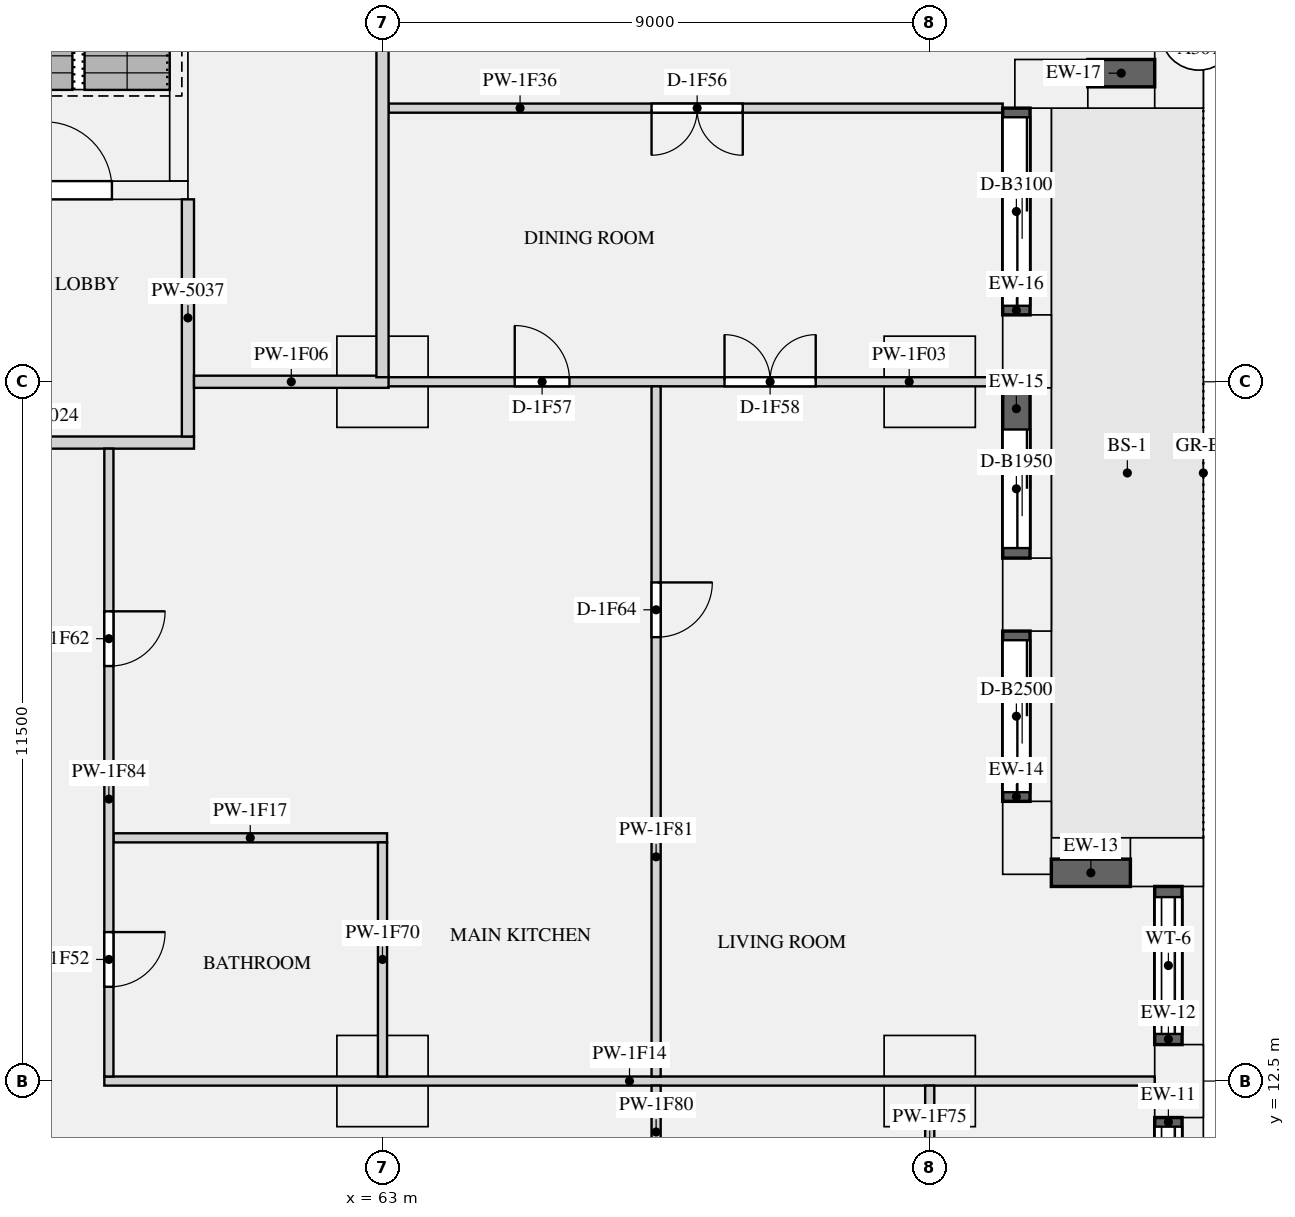
"""IFC4 building model, lengths in metres.
Left out: names, types, materials, properties, quantities, classifications, styles, units other than length and angle.
Written with IfcOpenShell. Run it as: python <this file> out.ifc"""

import sys

from ifc_helpers import new_model, si_unit, direction, frame, frame_2d, origin, origin_2d, place, context, subcontext, project, spatial, rectangle, extrude, element, fill, save


model = new_model("IFC4")
c1 = context("Model", 3, precision=1e-05, world=origin(), true_north=direction((0.0, 1.0)))
c2 = subcontext(c1, "Body", "Model", "MODEL_VIEW")
j1 = project(units=[si_unit("LENGTHUNIT", "METRE"), si_unit("PLANEANGLEUNIT", "RADIAN")], contexts=[c1])
p1 = place(None, origin())
s1 = spatial("IfcSite", under=j1, at=p1, CompositionType="ELEMENT")
p2 = place(p1, origin())
s2 = spatial("IfcBuilding", under=s1, at=p2, CompositionType="ELEMENT")
p3 = place(p2, frame((0.0, 0.0, 60.45)))
s3 = spatial("IfcBuildingStorey", under=s2, at=p3, CompositionType="ELEMENT", Elevation=60.45)
for number, where, z_axis, x_axis in (
    (1, (76.1, 12.5, 0.0), (0.0, 0.0, 1.0), (0.0, 1.0, 0.0)),
    (2, (75.9, 16.1, 0.0), (0.0, 0.0, 1.0), (-1.0, 0.0, 0.0)),
    (3, (73.6, 16.5, 0.0), (0.0, 0.0, 1.0), (0.0, 1.0, 0.0)),
    (4, (73.6, 20.5, 0.0), (0.0, 0.0, 1.0), (0.0, 1.0, 0.0)),
    (5, (73.6, 24.5, 0.0), (0.0, 0.0, 1.0), (0.0, 1.0, 0.0)),
    (6, (74.0, 28.9, 0.0), (0.0, 0.0, 1.0), (1.0, 0.0, 0.0)),
    (7, (76.1, 29.1, 0.0), (0.0, 0.0, 1.0), (0.0, 1.0, 0.0)),
):
    element("IfcColumn", number, at=place(p3, frame(where, z_axis=z_axis, x_axis=x_axis)), inside=s3, PredefinedType="USERDEFINED", context=c2, shape_type="SweptSolid", body=[
        extrude(rectangle(XDim=1.2, YDim=0.8, at=origin_2d()), origin(), (0.0, 0.0, 1.0), 3.15),
    ])
for number, where, z_axis, x_axis in (
    (8, (63.0, 24.0, 0.0), (0.0, 0.0, 1.0), (1.0, 0.0, 0.0)),
    (9, (72.0, 24.0, 0.0), (0.0, 0.0, 1.0), (1.0, 0.0, 0.0)),
    (10, (63.0, 12.5, 0.0), (0.0, 0.0, 1.0), (1.0, 0.0, 0.0)),
    (11, (72.0, 12.5, 0.0), (0.0, 0.0, 1.0), (1.0, 0.0, 0.0)),
):
    element("IfcColumn", number, at=place(p3, frame(where, z_axis=z_axis, x_axis=x_axis)), inside=s3, PredefinedType="COLUMN", context=c2, shape_type="SweptSolid", body=[
        extrude(rectangle(XDim=1.5, YDim=1.5, at=origin_2d()), origin(), (0.0, 0.0, 1.0), 3.15),
    ])
p4 = place(p3, frame((56.2, 27.15, 0.0), z_axis=(0.0, 0.0, 1.0), x_axis=(1.0, 0.0, 0.0)))
e12 = element("IfcWall", 12, at=p4, inside=s3, PredefinedType="SHEAR", context=c2, shape_type="SweptSolid", body=[
    extrude(rectangle(XDim=3.6, YDim=0.3, at=frame_2d((1.8, 0.0))), origin(), (0.0, 0.0, 1.0), 3.15),
])
p5 = place(p4, frame((1.25, 0.0, 0.0)))
e13 = element("IfcOpeningElement", 13, at=p5, cuts=e12, PredefinedType="OPENING", context=c2, shape_type="SweptSolid", body=[
    extrude(rectangle(XDim=1.1, YDim=2.1, at=frame_2d((0.55, 1.05))), frame((0.0, 0.16, 0.0), z_axis=(0.0, -1.0, 0.0), x_axis=(1.0, 0.0, 0.0)), (0.0, 0.0, 1.0), 0.32),
])
p6 = place(p3, frame((59.65, 27.3, 0.0), z_axis=(0.0, 0.0, 1.0), x_axis=(0.0, 1.0, 0.0)))
e14 = element("IfcWall", 14, at=p6, inside=s3, PredefinedType="SHEAR", context=c2, shape_type="SweptSolid", body=[
    extrude(rectangle(XDim=7.8, YDim=0.3, at=frame_2d((3.9, 0.0))), origin(), (0.0, 0.0, 1.0), 3.15),
])
p7 = place(p3, frame((75.925, 9.1, 0.9), z_axis=(0.0, 0.0, 1.0), x_axis=(0.0, 1.0, 0.0)))
e15 = element("IfcWall", 15, at=p7, inside=s3, PredefinedType="SOLIDWALL", context=c2, shape_type="SweptSolid", body=[
    extrude(rectangle(XDim=2.8, YDim=0.45, at=frame_2d((1.4, 0.0))), origin(), (0.0, 0.0, 1.0), 1.93),
])
p8 = place(p7, frame((0.15, 0.0, 0.15)))
e16 = element("IfcOpeningElement", 16, at=p8, cuts=e15, PredefinedType="OPENING", context=c2, shape_type="SweptSolid", body=[
    extrude(rectangle(XDim=2.5, YDim=1.5, at=frame_2d((1.25, 0.75))), frame((0.0, 0.235, 0.0), z_axis=(0.0, -1.0, 0.0), x_axis=(1.0, 0.0, 0.0)), (0.0, 0.0, 1.0), 0.47),
])
p9 = place(p3, frame((75.925, 13.1, 0.9), z_axis=(0.0, 0.0, 1.0), x_axis=(0.0, 1.0, 0.0)))
e17 = element("IfcWall", 17, at=p9, inside=s3, PredefinedType="SOLIDWALL", context=c2, shape_type="SweptSolid", body=[
    extrude(rectangle(XDim=2.6, YDim=0.45, at=frame_2d((1.3, 0.0))), origin(), (0.0, 0.0, 1.0), 1.93),
])
p10 = place(p9, frame((0.175, 0.0, 0.15)))
e18 = element("IfcOpeningElement", 18, at=p10, cuts=e17, PredefinedType="OPENING", context=c2, shape_type="SweptSolid", body=[
    extrude(rectangle(XDim=2.25, YDim=1.5, at=frame_2d((1.125, 0.75))), frame((0.0, 0.235, 0.0), z_axis=(0.0, -1.0, 0.0), x_axis=(1.0, 0.0, 0.0)), (0.0, 0.0, 1.0), 0.47),
])
p11 = place(p3, frame((75.3, 15.925, 0.9), z_axis=(0.0, 0.0, 1.0), x_axis=(-1.0, 0.0, 0.0)))
e19 = element("IfcWall", 19, at=p11, inside=s3, PredefinedType="SOLIDWALL", context=c2, shape_type="SweptSolid", body=[
    extrude(rectangle(XDim=1.3, YDim=0.45, at=frame_2d((0.65, 0.0))), origin(), (0.0, 0.0, 1.0), 1.93),
])
p12 = place(p3, frame((73.425, 17.1, 0.0), z_axis=(0.0, 0.0, 1.0), x_axis=(0.0, 1.0, 0.0)))
e20 = element("IfcWall", 20, at=p12, inside=s3, PredefinedType="SOLIDWALL", context=c2, shape_type="SweptSolid", body=[
    extrude(rectangle(XDim=2.8, YDim=0.45, at=frame_2d((1.4, 0.0))), origin(), (0.0, 0.0, 1.0), 2.83),
])
p13 = place(p12, frame((0.15, 0.0, 0.0)))
e21 = element("IfcOpeningElement", 21, at=p13, cuts=e20, PredefinedType="OPENING", context=c2, shape_type="SweptSolid", body=[
    extrude(rectangle(XDim=2.5, YDim=2.3, at=frame_2d((1.25, 1.15))), frame((0.0, 0.235, 0.0), z_axis=(0.0, -1.0, 0.0), x_axis=(1.0, 0.0, 0.0)), (0.0, 0.0, 1.0), 0.47),
])
p14 = place(p3, frame((73.425, 21.1, 0.0), z_axis=(0.0, 0.0, 1.0), x_axis=(0.0, 1.0, 0.0)))
e22 = element("IfcWall", 22, at=p14, inside=s3, PredefinedType="SOLIDWALL", context=c2, shape_type="SweptSolid", body=[
    extrude(rectangle(XDim=2.8, YDim=0.45, at=frame_2d((1.4, 0.0))), origin(), (0.0, 0.0, 1.0), 2.83),
])
p15 = place(p14, frame((0.165, 0.0, 0.0)))
e23 = element("IfcOpeningElement", 23, at=p15, cuts=e22, PredefinedType="OPENING", context=c2, shape_type="SweptSolid", body=[
    extrude(rectangle(XDim=1.95, YDim=2.3, at=frame_2d((0.975, 1.15))), frame((0.0, 0.235, 0.0), z_axis=(0.0, -1.0, 0.0), x_axis=(1.0, 0.0, 0.0)), (0.0, 0.0, 1.0), 0.47),
])
p16 = place(p3, frame((73.425, 25.1, 0.0), z_axis=(0.0, 0.0, 1.0), x_axis=(0.0, 1.0, 0.0)))
e24 = element("IfcWall", 24, at=p16, inside=s3, PredefinedType="SOLIDWALL", context=c2, shape_type="SweptSolid", body=[
    extrude(rectangle(XDim=3.4, YDim=0.45, at=frame_2d((1.7, 0.0))), origin(), (0.0, 0.0, 1.0), 2.83),
])
p17 = place(p16, frame((0.15, 0.0, 0.0)))
e25 = element("IfcOpeningElement", 25, at=p17, cuts=e24, PredefinedType="OPENING", context=c2, shape_type="SweptSolid", body=[
    extrude(rectangle(XDim=3.1, YDim=2.3, at=frame_2d((1.55, 1.15))), frame((0.0, 0.235, 0.0), z_axis=(0.0, -1.0, 0.0), x_axis=(1.0, 0.0, 0.0)), (0.0, 0.0, 1.0), 0.47),
])
p18 = place(p3, frame((74.6, 29.075, 0.9), z_axis=(0.0, 0.0, 1.0), x_axis=(1.0, 0.0, 0.0)))
e26 = element("IfcWall", 26, at=p18, inside=s3, PredefinedType="SOLIDWALL", context=c2, shape_type="SweptSolid", body=[
    extrude(rectangle(XDim=1.1, YDim=0.45, at=frame_2d((0.55, 0.0))), origin(), (0.0, 0.0, 1.0), 1.93),
])
p19 = place(p3, frame((54.9, 23.0, 0.0), z_axis=(0.0, 0.0, 1.0), x_axis=(1.0, 0.0, 0.0)))
e27 = element("IfcWall", 27, at=p19, inside=s3, PredefinedType="PARTITIONING", context=c2, shape_type="SweptSolid", body=[
    extrude(rectangle(XDim=5.0, YDim=0.2, at=frame_2d((2.5, 0.0))), origin(), (0.0, 0.0, 1.0), 2.83),
])
p20 = place(p3, frame((59.8, 23.1, 0.0), z_axis=(0.0, 0.0, 1.0), x_axis=(0.0, 1.0, 0.0)))
e28 = element("IfcWall", 28, at=p20, inside=s3, PredefinedType="PARTITIONING", context=c2, shape_type="SweptSolid", body=[
    extrude(rectangle(XDim=3.9, YDim=0.2, at=frame_2d((1.95, 0.0))), origin(), (0.0, 0.0, 1.0), 2.83),
])
p21 = place(p3, frame((62.9, 24.0, 0.0), z_axis=(0.0, 0.0, 1.0), x_axis=(1.0, 0.0, 0.0)))
e29 = element("IfcWall", 29, at=p21, inside=s3, PredefinedType="PARTITIONING", context=c2, shape_type="SweptSolid", body=[
    extrude(rectangle(XDim=10.3, YDim=0.15, at=frame_2d((5.15, 0.0))), origin(), (0.0, 0.0, 1.0), 2.83),
])
p22 = place(p21, frame((2.275, 0.0, 0.0)))
e30 = element("IfcOpeningElement", 30, at=p22, cuts=e29, PredefinedType="OPENING", context=c2, shape_type="SweptSolid", body=[
    extrude(rectangle(XDim=0.9, YDim=2.1, at=frame_2d((0.45, 1.05))), frame((0.0, 0.085, 0.0), z_axis=(0.0, -1.0, 0.0), x_axis=(1.0, 0.0, 0.0)), (0.0, 0.0, 1.0), 0.17),
])
p23 = place(p21, frame((5.725, 0.0, 0.0)))
e31 = element("IfcOpeningElement", 31, at=p23, cuts=e29, PredefinedType="OPENING", context=c2, shape_type="SweptSolid", body=[
    extrude(rectangle(XDim=1.5, YDim=2.1, at=frame_2d((0.75, 1.05))), frame((0.0, 0.085, 0.0), z_axis=(0.0, -1.0, 0.0), x_axis=(1.0, 0.0, 0.0)), (0.0, 0.0, 1.0), 0.17),
])
p24 = place(p3, frame((59.9, 24.0, 0.0), z_axis=(0.0, 0.0, 1.0), x_axis=(1.0, 0.0, 0.0)))
e32 = element("IfcWall", 32, at=p24, inside=s3, PredefinedType="PARTITIONING", context=c2, shape_type="SweptSolid", body=[
    extrude(rectangle(XDim=3.2, YDim=0.2, at=frame_2d((1.6, 0.0))), origin(), (0.0, 0.0, 1.0), 2.83),
])
p25 = place(p3, frame((58.425, 12.5, 0.0), z_axis=(0.0, 0.0, 1.0), x_axis=(1.0, 0.0, 0.0)))
e33 = element("IfcWall", 33, at=p25, inside=s3, PredefinedType="PARTITIONING", context=c2, shape_type="SweptSolid", body=[
    extrude(rectangle(XDim=17.275, YDim=0.15, at=frame_2d((8.637, 0.0))), origin(), (0.0, 0.0, 1.0), 2.83),
])
p26 = place(p3, frame((58.575, 16.5, 0.0), z_axis=(0.0, 0.0, 1.0), x_axis=(1.0, 0.0, 0.0)))
e34 = element("IfcWall", 34, at=p26, inside=s3, PredefinedType="PARTITIONING", context=c2, shape_type="SweptSolid", body=[
    extrude(rectangle(XDim=4.5, YDim=0.15, at=frame_2d((2.25, 0.0))), origin(), (0.0, 0.0, 1.0), 2.83),
])
p27 = place(p3, frame((63.1, 28.5, 0.0), z_axis=(0.0, 0.0, 1.0), x_axis=(1.0, 0.0, 0.0)))
e35 = element("IfcWall", 35, at=p27, inside=s3, PredefinedType="PARTITIONING", context=c2, shape_type="SweptSolid", body=[
    extrude(rectangle(XDim=10.1, YDim=0.15, at=frame_2d((5.05, 0.0))), origin(), (0.0, 0.0, 1.0), 2.83),
])
p28 = place(p27, frame((4.325, 0.0, 0.0)))
e36 = element("IfcOpeningElement", 36, at=p28, cuts=e35, PredefinedType="OPENING", context=c2, shape_type="SweptSolid", body=[
    extrude(rectangle(XDim=1.5, YDim=2.1, at=frame_2d((0.75, 1.05))), frame((0.0, 0.085, 0.0), z_axis=(0.0, -1.0, 0.0), x_axis=(1.0, 0.0, 0.0)), (0.0, 0.0, 1.0), 0.17),
])
p29 = place(p3, frame((63.0, 12.575, 0.0), z_axis=(0.0, 0.0, 1.0), x_axis=(0.0, 1.0, 0.0)))
e37 = element("IfcWall", 37, at=p29, inside=s3, PredefinedType="PARTITIONING", context=c2, shape_type="SweptSolid", body=[
    extrude(rectangle(XDim=3.85, YDim=0.15, at=frame_2d((1.925, 0.0))), origin(), (0.0, 0.0, 1.0), 2.83),
])
p30 = place(p3, frame((63.0, 24.075, 0.0), z_axis=(0.0, 0.0, 1.0), x_axis=(0.0, 1.0, 0.0)))
e38 = element("IfcWall", 38, at=p30, inside=s3, PredefinedType="PARTITIONING", context=c2, shape_type="SweptSolid", body=[
    extrude(rectangle(XDim=12.075, YDim=0.2, at=frame_2d((6.038, 0.0))), origin(), (0.0, 0.0, 1.0), 2.83),
])
p31 = place(p3, frame((72.0, 8.575, 0.0), z_axis=(0.0, 0.0, 1.0), x_axis=(0.0, 1.0, 0.0)))
e39 = element("IfcWall", 39, at=p31, inside=s3, PredefinedType="PARTITIONING", context=c2, shape_type="SweptSolid", body=[
    extrude(rectangle(XDim=3.85, YDim=0.15, at=frame_2d((1.925, 0.0))), origin(), (0.0, 0.0, 1.0), 2.83),
])
p32 = place(p31, frame((1.15, 0.0, 0.0)))
e40 = element("IfcOpeningElement", 40, at=p32, cuts=e39, PredefinedType="OPENING", context=c2, shape_type="SweptSolid", body=[
    extrude(rectangle(XDim=0.8, YDim=2.1, at=frame_2d((0.4, 1.05))), frame((0.0, 0.085, 0.0), z_axis=(0.0, -1.0, 0.0), x_axis=(1.0, 0.0, 0.0)), (0.0, 0.0, 1.0), 0.17),
])
p33 = place(p3, frame((67.5, 8.575, 0.0), z_axis=(0.0, 0.0, 1.0), x_axis=(0.0, 1.0, 0.0)))
e41 = element("IfcWall", 41, at=p33, inside=s3, PredefinedType="PARTITIONING", context=c2, shape_type="SweptSolid", body=[
    extrude(rectangle(XDim=3.85, YDim=0.15, at=frame_2d((1.925, 0.0))), origin(), (0.0, 0.0, 1.0), 2.83),
])
p34 = place(p33, frame((1.525, 0.0, 0.0)))
e42 = element("IfcOpeningElement", 42, at=p34, cuts=e41, PredefinedType="OPENING", context=c2, shape_type="SweptSolid", body=[
    extrude(rectangle(XDim=0.8, YDim=2.1, at=frame_2d((0.4, 1.05))), frame((0.0, 0.085, 0.0), z_axis=(0.0, -1.0, 0.0), x_axis=(1.0, 0.0, 0.0)), (0.0, 0.0, 1.0), 0.17),
])
p35 = place(p3, frame((67.5, 12.575, 0.0), z_axis=(0.0, 0.0, 1.0), x_axis=(0.0, 1.0, 0.0)))
e43 = element("IfcWall", 43, at=p35, inside=s3, PredefinedType="PARTITIONING", context=c2, shape_type="SweptSolid", body=[
    extrude(rectangle(XDim=11.35, YDim=0.15, at=frame_2d((5.675, 0.0))), origin(), (0.0, 0.0, 1.0), 2.83),
])
p36 = place(p35, frame((7.225, 0.0, 0.0)))
e44 = element("IfcOpeningElement", 44, at=p36, cuts=e43, PredefinedType="OPENING", context=c2, shape_type="SweptSolid", body=[
    extrude(rectangle(XDim=0.9, YDim=2.1, at=frame_2d((0.45, 1.05))), frame((0.0, 0.085, 0.0), z_axis=(0.0, -1.0, 0.0), x_axis=(1.0, 0.0, 0.0)), (0.0, 0.0, 1.0), 0.17),
])
p37 = place(p3, frame((58.5, 12.575, 0.0), z_axis=(0.0, 0.0, 1.0), x_axis=(0.0, 1.0, 0.0)))
e45 = element("IfcWall", 45, at=p37, inside=s3, PredefinedType="PARTITIONING", context=c2, shape_type="SweptSolid", body=[
    extrude(rectangle(XDim=10.325, YDim=0.15, at=frame_2d((5.163, 0.0))), origin(), (0.0, 0.0, 1.0), 2.83),
])
p38 = place(p37, frame((1.475, 0.0, 0.0)))
e46 = element("IfcOpeningElement", 46, at=p38, cuts=e45, PredefinedType="OPENING", context=c2, shape_type="SweptSolid", body=[
    extrude(rectangle(XDim=0.9, YDim=2.1, at=frame_2d((0.45, 1.05))), frame((0.0, 0.085, 0.0), z_axis=(0.0, -1.0, 0.0), x_axis=(1.0, 0.0, 0.0)), (0.0, 0.0, 1.0), 0.17),
])
p39 = place(p37, frame((6.75, 0.0, 0.0)))
e47 = element("IfcOpeningElement", 47, at=p39, cuts=e45, PredefinedType="OPENING", context=c2, shape_type="SweptSolid", body=[
    extrude(rectangle(XDim=0.9, YDim=2.1, at=frame_2d((0.45, 1.05))), frame((0.0, 0.085, 0.0), z_axis=(0.0, -1.0, 0.0), x_axis=(1.0, 0.0, 0.0)), (0.0, 0.0, 1.0), 0.17),
])
p40 = place(p8, origin())
e48 = element("IfcWindow", 48, at=p40, inside=s3, PartitioningType="SINGLE_PANEL", PredefinedType="WINDOW", context=c2, shape_type="SweptSolid", body=[
    extrude(rectangle(XDim=2.5, YDim=1.5, at=frame_2d((1.25, 0.75))), frame((0.0, -0.065, 0.0), z_axis=(0.0, -1.0, 0.0), x_axis=(1.0, 0.0, 0.0)), (0.0, 0.0, 1.0), 0.06),
])
fill(e16, e48)
p41 = place(p10, origin())
e49 = element("IfcWindow", 49, at=p41, inside=s3, PartitioningType="SINGLE_PANEL", PredefinedType="WINDOW", context=c2, shape_type="SweptSolid", body=[
    extrude(rectangle(XDim=2.25, YDim=1.5, at=frame_2d((1.125, 0.75))), frame((0.0, -0.065, 0.0), z_axis=(0.0, -1.0, 0.0), x_axis=(1.0, 0.0, 0.0)), (0.0, 0.0, 1.0), 0.06),
])
fill(e18, e49)
p42 = place(p13, origin())
e50 = element("IfcDoor", 50, at=p42, inside=s3, OperationType="SLIDING_TO_LEFT", PredefinedType="DOOR", context=c2, shape_type="SweptSolid", body=[
    extrude(rectangle(XDim=2.5, YDim=2.3, at=frame_2d((1.25, 1.15))), frame((0.0, -0.07, 0.0), z_axis=(0.0, -1.0, 0.0), x_axis=(1.0, 0.0, 0.0)), (0.0, 0.0, 1.0), 0.05),
])
fill(e21, e50)
p43 = place(p15, origin())
e51 = element("IfcDoor", 51, at=p43, inside=s3, OperationType="SLIDING_TO_LEFT", PredefinedType="DOOR", context=c2, shape_type="SweptSolid", body=[
    extrude(rectangle(XDim=1.95, YDim=2.3, at=frame_2d((0.975, 1.15))), frame((0.0, -0.07, 0.0), z_axis=(0.0, -1.0, 0.0), x_axis=(1.0, 0.0, 0.0)), (0.0, 0.0, 1.0), 0.05),
])
fill(e23, e51)
p44 = place(p17, origin())
e52 = element("IfcDoor", 52, at=p44, inside=s3, OperationType="SLIDING_TO_LEFT", PredefinedType="DOOR", context=c2, shape_type="SweptSolid", body=[
    extrude(rectangle(XDim=3.1, YDim=2.3, at=frame_2d((1.55, 1.15))), frame((0.0, -0.07, 0.0), z_axis=(0.0, -1.0, 0.0), x_axis=(1.0, 0.0, 0.0)), (0.0, 0.0, 1.0), 0.05),
])
fill(e25, e52)
p45 = place(p5, origin())
e53 = element("IfcDoor", 53, at=p45, inside=s3, OperationType="SINGLE_SWING_LEFT", PredefinedType="DOOR", context=c2, shape_type="SweptSolid", body=[
    extrude(rectangle(XDim=1.1, YDim=2.1, at=frame_2d((0.55, 1.05))), frame((0.0, 0.025, 0.0), z_axis=(0.0, -1.0, 0.0), x_axis=(1.0, 0.0, 0.0)), (0.0, 0.0, 1.0), 0.05),
])
fill(e13, e53)
p46 = place(p38, frame((0.9, 0.0, 0.0), z_axis=(0.0, 0.0, 1.0), x_axis=(-1.0, 0.0, 0.0)))
e54 = element("IfcDoor", 54, at=p46, inside=s3, OperationType="SINGLE_SWING_LEFT", PredefinedType="DOOR", context=c2, shape_type="SweptSolid", body=[
    extrude(rectangle(XDim=0.9, YDim=2.1, at=frame_2d((0.45, 1.05))), frame((0.0, 0.025, 0.0), z_axis=(0.0, -1.0, 0.0), x_axis=(1.0, 0.0, 0.0)), (0.0, 0.0, 1.0), 0.05),
])
fill(e46, e54)
p47 = place(p28, frame((1.5, 0.0, 0.0), z_axis=(0.0, 0.0, 1.0), x_axis=(-1.0, 0.0, 0.0)))
e55 = element("IfcDoor", 55, at=p47, inside=s3, OperationType="DOUBLE_DOOR_SINGLE_SWING", PredefinedType="DOOR", context=c2, shape_type="SweptSolid", body=[
    extrude(rectangle(XDim=1.5, YDim=2.1, at=frame_2d((0.75, 1.05))), frame((0.0, 0.025, 0.0), z_axis=(0.0, -1.0, 0.0), x_axis=(1.0, 0.0, 0.0)), (0.0, 0.0, 1.0), 0.05),
])
fill(e36, e55)
p48 = place(p22, origin())
e56 = element("IfcDoor", 56, at=p48, inside=s3, OperationType="SINGLE_SWING_LEFT", PredefinedType="DOOR", context=c2, shape_type="SweptSolid", body=[
    extrude(rectangle(XDim=0.9, YDim=2.1, at=frame_2d((0.45, 1.05))), frame((0.0, 0.025, 0.0), z_axis=(0.0, -1.0, 0.0), x_axis=(1.0, 0.0, 0.0)), (0.0, 0.0, 1.0), 0.05),
])
fill(e30, e56)
p49 = place(p23, origin())
e57 = element("IfcDoor", 57, at=p49, inside=s3, OperationType="DOUBLE_DOOR_SINGLE_SWING", PredefinedType="DOOR", context=c2, shape_type="SweptSolid", body=[
    extrude(rectangle(XDim=1.5, YDim=2.1, at=frame_2d((0.75, 1.05))), frame((0.0, 0.025, 0.0), z_axis=(0.0, -1.0, 0.0), x_axis=(1.0, 0.0, 0.0)), (0.0, 0.0, 1.0), 0.05),
])
fill(e31, e57)
p50 = place(p39, frame((0.9, 0.0, 0.0), z_axis=(0.0, 0.0, 1.0), x_axis=(-1.0, 0.0, 0.0)))
e58 = element("IfcDoor", 58, at=p50, inside=s3, OperationType="SINGLE_SWING_LEFT", PredefinedType="DOOR", context=c2, shape_type="SweptSolid", body=[
    extrude(rectangle(XDim=0.9, YDim=2.1, at=frame_2d((0.45, 1.05))), frame((0.0, 0.025, 0.0), z_axis=(0.0, -1.0, 0.0), x_axis=(1.0, 0.0, 0.0)), (0.0, 0.0, 1.0), 0.05),
])
fill(e47, e58)
p51 = place(p36, frame((0.9, 0.0, 0.0), z_axis=(0.0, 0.0, 1.0), x_axis=(-1.0, 0.0, 0.0)))
e59 = element("IfcDoor", 59, at=p51, inside=s3, OperationType="SINGLE_SWING_LEFT", PredefinedType="DOOR", context=c2, shape_type="SweptSolid", body=[
    extrude(rectangle(XDim=0.9, YDim=2.1, at=frame_2d((0.45, 1.05))), frame((0.0, 0.025, 0.0), z_axis=(0.0, -1.0, 0.0), x_axis=(1.0, 0.0, 0.0)), (0.0, 0.0, 1.0), 0.05),
])
fill(e44, e59)
save(model, sys.argv[1])
